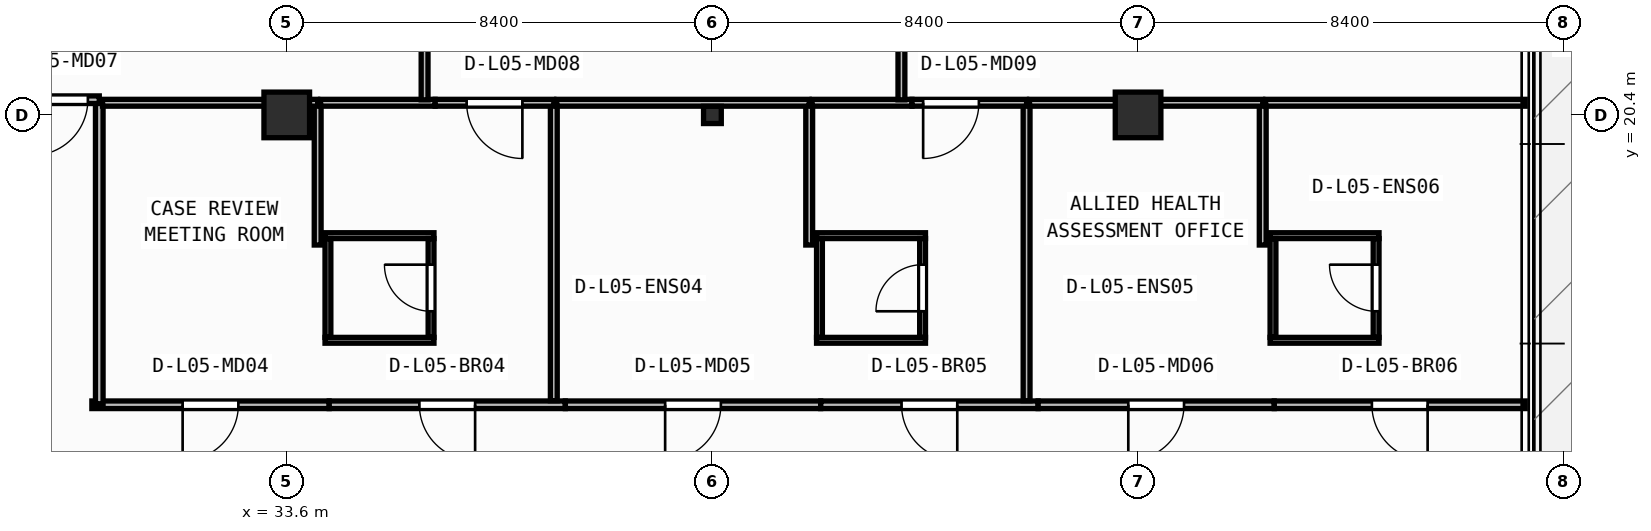
"""IFC4 building model, lengths in metres.
Left out: names, types, materials, properties, quantities, classifications, styles, units other than length and angle.
Written with IfcOpenShell. Run it as: python <this file> out.ifc"""

import sys

from ifc_helpers import new_model, si_unit, direction, frame, frame_2d, origin, origin_2d, place, context, subcontext, project, spatial, rectangle, i_section, extrude, element, fill, save


model = new_model("IFC4")
c1 = context("Model", 3, precision=1e-05, world=origin(), true_north=direction((0.0, 1.0)))
c2 = subcontext(c1, "Body", "Model", "MODEL_VIEW")
j1 = project(units=[si_unit("LENGTHUNIT", "METRE"), si_unit("PLANEANGLEUNIT", "RADIAN")], contexts=[c1])
p1 = place(None, origin())
s1 = spatial("IfcSite", under=j1, at=p1, CompositionType="ELEMENT")
p2 = place(p1, origin())
s2 = spatial("IfcBuilding", under=s1, at=p2, CompositionType="ELEMENT")
p3 = place(p2, frame((0.0, 0.0, 22.5)))
s3 = spatial("IfcBuildingStorey", under=s2, at=p3, CompositionType="ELEMENT", Elevation=22.5)
p4 = place(p3, frame((33.6, 20.4, 0.0), z_axis=(0.0, 0.0, 1.0), x_axis=(1.0, 0.0, 0.0)))
e1 = element("IfcColumn", 1, at=p4, inside=s3, PredefinedType="COLUMN", context=c2, shape_type="SweptSolid", body=[
    extrude(rectangle(XDim=0.9, YDim=0.9, at=origin_2d()), origin(), (0.0, 0.0, 1.0), 3.95),
])
p5 = place(p3, frame((42.0, 20.4, 0.0), z_axis=(0.0, 0.0, 1.0), x_axis=(1.0, 0.0, 0.0)))
e2 = element("IfcColumn", 2, at=p5, inside=s3, PredefinedType="COLUMN", context=c2, shape_type="SweptSolid", body=[
    extrude(i_section(OverallWidth=0.35, OverallDepth=0.34, WebThickness=0.016, FlangeThickness=0.028, at=origin_2d()), origin(), (0.0, 0.0, 1.0), 3.95),
])
p6 = place(p3, frame((50.4, 20.4, 0.0), z_axis=(0.0, 0.0, 1.0), x_axis=(1.0, 0.0, 0.0)))
e3 = element("IfcColumn", 3, at=p6, inside=s3, PredefinedType="COLUMN", context=c2, shape_type="SweptSolid", body=[
    extrude(rectangle(XDim=0.9, YDim=0.9, at=origin_2d()), origin(), (0.0, 0.0, 1.0), 3.95),
])
p7 = place(p3, frame((34.355, 15.952, 0.0), z_axis=(0.0, 0.0, 1.0), x_axis=(1.0, 0.0, 0.0)))
e4 = element("IfcWall", 4, at=p7, inside=s3, PredefinedType="PARTITIONING", context=c2, shape_type="SweptSolid", body=[
    extrude(rectangle(XDim=2.15, YDim=0.115, at=frame_2d((1.075, 0.0))), origin(), (0.0, 0.0, 1.0), 3.381),
])
p8 = place(p3, frame((34.355, 18.018, 0.0), z_axis=(0.0, 0.0, 1.0), x_axis=(1.0, 0.0, 0.0)))
e5 = element("IfcWall", 5, at=p8, inside=s3, PredefinedType="PARTITIONING", context=c2, shape_type="SweptSolid", body=[
    extrude(rectangle(XDim=2.15, YDim=0.115, at=frame_2d((1.075, 0.0))), origin(), (0.0, 0.0, 1.0), 3.71),
])
p9 = place(p3, frame((34.413, 16.01, 0.0), z_axis=(0.0, 0.0, 1.0), x_axis=(0.0, 1.0, 0.0)))
e6 = element("IfcWall", 6, at=p9, inside=s3, PredefinedType="PARTITIONING", context=c2, shape_type="SweptSolid", body=[
    extrude(rectangle(XDim=1.95, YDim=0.115, at=frame_2d((0.975, 0.0))), origin(), (0.0, 0.0, 1.0), 3.71),
])
p10 = place(p3, frame((36.448, 16.01, 0.0), z_axis=(0.0, 0.0, 1.0), x_axis=(0.0, 1.0, 0.0)))
e7 = element("IfcWall", 7, at=p10, inside=s3, PredefinedType="PARTITIONING", context=c2, shape_type="SweptSolid", body=[
    extrude(rectangle(XDim=1.95, YDim=0.115, at=frame_2d((0.975, 0.0))), origin(), (0.0, 0.0, 1.0), 3.71),
])
p11 = place(p10, frame((0.515, 0.0, 0.0)))
e8 = element("IfcOpeningElement", 8, at=p11, cuts=e7, PredefinedType="OPENING", context=c2, shape_type="SweptSolid", body=[
    extrude(rectangle(XDim=0.92, YDim=2.1, at=frame_2d((0.46, 1.05))), frame((0.0, 0.067, 0.0), z_axis=(0.0, -1.0, 0.0), x_axis=(1.0, 0.0, 0.0)), (0.0, 0.0, 1.0), 0.135),
])
p12 = place(p3, frame((44.055, 15.952, 0.0), z_axis=(0.0, 0.0, 1.0), x_axis=(1.0, 0.0, 0.0)))
e9 = element("IfcWall", 9, at=p12, inside=s3, PredefinedType="PARTITIONING", context=c2, shape_type="SweptSolid", body=[
    extrude(rectangle(XDim=2.15, YDim=0.115, at=frame_2d((1.075, 0.0))), origin(), (0.0, 0.0, 1.0), 3.381),
])
p13 = place(p3, frame((44.055, 18.018, 0.0), z_axis=(0.0, 0.0, 1.0), x_axis=(1.0, 0.0, 0.0)))
e10 = element("IfcWall", 10, at=p13, inside=s3, PredefinedType="PARTITIONING", context=c2, shape_type="SweptSolid", body=[
    extrude(rectangle(XDim=2.15, YDim=0.115, at=frame_2d((1.075, 0.0))), origin(), (0.0, 0.0, 1.0), 3.71),
])
p14 = place(p3, frame((44.113, 16.01, 0.0), z_axis=(0.0, 0.0, 1.0), x_axis=(0.0, 1.0, 0.0)))
e11 = element("IfcWall", 11, at=p14, inside=s3, PredefinedType="PARTITIONING", context=c2, shape_type="SweptSolid", body=[
    extrude(rectangle(XDim=1.95, YDim=0.115, at=frame_2d((0.975, 0.0))), origin(), (0.0, 0.0, 1.0), 3.71),
])
p15 = place(p3, frame((46.147, 16.01, 0.0), z_axis=(0.0, 0.0, 1.0), x_axis=(0.0, 1.0, 0.0)))
e12 = element("IfcWall", 12, at=p15, inside=s3, PredefinedType="PARTITIONING", context=c2, shape_type="SweptSolid", body=[
    extrude(rectangle(XDim=1.95, YDim=0.115, at=frame_2d((0.975, 0.0))), origin(), (0.0, 0.0, 1.0), 3.71),
])
p16 = place(p15, frame((0.515, 0.0, 0.0)))
e13 = element("IfcOpeningElement", 13, at=p16, cuts=e12, PredefinedType="OPENING", context=c2, shape_type="SweptSolid", body=[
    extrude(rectangle(XDim=0.92, YDim=2.1, at=frame_2d((0.46, 1.05))), frame((0.0, 0.067, 0.0), z_axis=(0.0, -1.0, 0.0), x_axis=(1.0, 0.0, 0.0)), (0.0, 0.0, 1.0), 0.135),
])
for number, where, z_axis, x_axis in (
    (14, (53.005, 15.952, 0.0), (0.0, 0.0, 1.0), (1.0, 0.0, 0.0)),
    (15, (53.005, 18.018, 0.0), (0.0, 0.0, 1.0), (1.0, 0.0, 0.0)),
):
    element("IfcWall", number, at=place(p3, frame(where, z_axis=z_axis, x_axis=x_axis)), inside=s3, PredefinedType="PARTITIONING", context=c2, shape_type="SweptSolid", body=[
        extrude(rectangle(XDim=2.15, YDim=0.115, at=frame_2d((1.075, 0.0))), origin(), (0.0, 0.0, 1.0), 3.71),
    ])
p17 = place(p3, frame((53.062, 16.01, 0.0), z_axis=(0.0, 0.0, 1.0), x_axis=(0.0, 1.0, 0.0)))
e16 = element("IfcWall", 16, at=p17, inside=s3, PredefinedType="PARTITIONING", context=c2, shape_type="SweptSolid", body=[
    extrude(rectangle(XDim=1.95, YDim=0.115, at=frame_2d((0.975, 0.0))), origin(), (0.0, 0.0, 1.0), 3.71),
])
p18 = place(p3, frame((55.097, 16.01, 0.0), z_axis=(0.0, 0.0, 1.0), x_axis=(0.0, 1.0, 0.0)))
e17 = element("IfcWall", 17, at=p18, inside=s3, PredefinedType="PARTITIONING", context=c2, shape_type="SweptSolid", body=[
    extrude(rectangle(XDim=1.95, YDim=0.115, at=frame_2d((0.975, 0.0))), origin(), (0.0, 0.0, 1.0), 3.71),
])
p19 = place(p18, frame((0.515, 0.0, 0.0)))
e18 = element("IfcOpeningElement", 18, at=p19, cuts=e17, PredefinedType="OPENING", context=c2, shape_type="SweptSolid", body=[
    extrude(rectangle(XDim=0.92, YDim=2.1, at=frame_2d((0.46, 1.05))), frame((0.0, 0.067, 0.0), z_axis=(0.0, -1.0, 0.0), x_axis=(1.0, 0.0, 0.0)), (0.0, 0.0, 1.0), 0.135),
])
p20 = place(p3, frame((34.436, 14.68, 0.0), z_axis=(0.0, 0.0, 1.0), x_axis=(-1.0, 0.0, 0.0)))
e19 = element("IfcWall", 19, at=p20, inside=s3, PredefinedType="PARTITIONING", context=c2, shape_type="SweptSolid", body=[
    extrude(rectangle(XDim=4.682, YDim=0.15, at=frame_2d((2.341, 0.0))), origin(), (0.0, 0.0, 1.0), 3.71),
])
p21 = place(p20, frame((1.791, 0.0, 0.0)))
e20 = element("IfcOpeningElement", 20, at=p21, cuts=e19, PredefinedType="OPENING", context=c2, shape_type="SweptSolid", body=[
    extrude(rectangle(XDim=1.1, YDim=2.1, at=frame_2d((0.55, 1.05))), frame((0.0, 0.085, 0.0), z_axis=(0.0, -1.0, 0.0), x_axis=(1.0, 0.0, 0.0)), (0.0, 0.0, 1.0), 0.17),
])
p22 = place(p3, frame((39.096, 14.68, 0.0), z_axis=(0.0, 0.0, 1.0), x_axis=(-1.0, 0.0, 0.0)))
e21 = element("IfcWall", 21, at=p22, inside=s3, PredefinedType="PARTITIONING", context=c2, shape_type="SweptSolid", body=[
    extrude(rectangle(XDim=4.658, YDim=0.15, at=frame_2d((2.329, 0.0))), origin(), (0.0, 0.0, 1.0), 3.71),
])
p23 = place(p22, frame((1.779, 0.0, 0.0)))
e22 = element("IfcOpeningElement", 22, at=p23, cuts=e21, PredefinedType="OPENING", context=c2, shape_type="SweptSolid", body=[
    extrude(rectangle(XDim=1.1, YDim=2.1, at=frame_2d((0.55, 1.05))), frame((0.0, 0.085, 0.0), z_axis=(0.0, -1.0, 0.0), x_axis=(1.0, 0.0, 0.0)), (0.0, 0.0, 1.0), 0.17),
])
p24 = place(p3, frame((44.136, 14.68, 0.0), z_axis=(0.0, 0.0, 1.0), x_axis=(-1.0, 0.0, 0.0)))
e23 = element("IfcWall", 23, at=p24, inside=s3, PredefinedType="PARTITIONING", context=c2, shape_type="SweptSolid", body=[
    extrude(rectangle(XDim=5.038, YDim=0.15, at=frame_2d((2.519, 0.0))), origin(), (0.0, 0.0, 1.0), 3.71),
])
p25 = place(p24, frame((1.969, 0.0, 0.0)))
e24 = element("IfcOpeningElement", 24, at=p25, cuts=e23, PredefinedType="OPENING", context=c2, shape_type="SweptSolid", body=[
    extrude(rectangle(XDim=1.1, YDim=2.1, at=frame_2d((0.55, 1.05))), frame((0.0, 0.085, 0.0), z_axis=(0.0, -1.0, 0.0), x_axis=(1.0, 0.0, 0.0)), (0.0, 0.0, 1.0), 0.17),
])
p26 = place(p3, frame((48.426, 14.68, 0.0), z_axis=(0.0, 0.0, 1.0), x_axis=(-1.0, 0.0, 0.0)))
e25 = element("IfcWall", 25, at=p26, inside=s3, PredefinedType="PARTITIONING", context=c2, shape_type="SweptSolid", body=[
    extrude(rectangle(XDim=4.288, YDim=0.15, at=frame_2d((2.144, 0.0))), origin(), (0.0, 0.0, 1.0), 3.71),
])
p27 = place(p26, frame((1.594, 0.0, 0.0)))
e26 = element("IfcOpeningElement", 26, at=p27, cuts=e25, PredefinedType="OPENING", context=c2, shape_type="SweptSolid", body=[
    extrude(rectangle(XDim=1.1, YDim=2.1, at=frame_2d((0.55, 1.05))), frame((0.0, 0.085, 0.0), z_axis=(0.0, -1.0, 0.0), x_axis=(1.0, 0.0, 0.0)), (0.0, 0.0, 1.0), 0.17),
])
p28 = place(p3, frame((53.086, 14.68, 0.0), z_axis=(0.0, 0.0, 1.0), x_axis=(-1.0, 0.0, 0.0)))
e27 = element("IfcWall", 27, at=p28, inside=s3, PredefinedType="PARTITIONING", context=c2, shape_type="SweptSolid", body=[
    extrude(rectangle(XDim=4.658, YDim=0.15, at=frame_2d((2.329, 0.0))), origin(), (0.0, 0.0, 1.0), 3.71),
])
p29 = place(p28, frame((1.779, 0.0, 0.0)))
e28 = element("IfcOpeningElement", 28, at=p29, cuts=e27, PredefinedType="OPENING", context=c2, shape_type="SweptSolid", body=[
    extrude(rectangle(XDim=1.1, YDim=2.1, at=frame_2d((0.55, 1.05))), frame((0.0, 0.085, 0.0), z_axis=(0.0, -1.0, 0.0), x_axis=(1.0, 0.0, 0.0)), (0.0, 0.0, 1.0), 0.17),
])
p30 = place(p3, frame((58.04, 14.68, 0.0), z_axis=(0.0, 0.0, 1.0), x_axis=(-1.0, 0.0, 0.0)))
e29 = element("IfcWall", 29, at=p30, inside=s3, PredefinedType="PARTITIONING", context=c2, shape_type="SweptSolid", body=[
    extrude(rectangle(XDim=4.952, YDim=0.15, at=frame_2d((2.476, 0.0))), origin(), (0.0, 0.0, 1.0), 3.71),
])
p31 = place(p30, frame((1.926, 0.0, 0.0)))
e30 = element("IfcOpeningElement", 30, at=p31, cuts=e29, PredefinedType="OPENING", context=c2, shape_type="SweptSolid", body=[
    extrude(rectangle(XDim=1.1, YDim=2.1, at=frame_2d((0.55, 1.05))), frame((0.0, 0.085, 0.0), z_axis=(0.0, -1.0, 0.0), x_axis=(1.0, 0.0, 0.0)), (0.0, 0.0, 1.0), 0.17),
])
p32 = place(p3, frame((29.9, 14.7, 0.0), z_axis=(0.0, 0.0, 1.0), x_axis=(0.0, 1.0, 0.0)))
e31 = element("IfcWall", 31, at=p32, inside=s3, PredefinedType="PARTITIONING", context=c2, shape_type="SweptSolid", body=[
    extrude(rectangle(XDim=6.0, YDim=0.15, at=frame_2d((3.0, 0.0))), origin(), (0.0, 0.0, 1.0), 3.71),
])
p33 = place(p3, frame((29.9, 20.7, 0.0), z_axis=(0.0, 0.0, 1.0), x_axis=(-1.0, 0.0, 0.0)))
e32 = element("IfcWall", 32, at=p33, inside=s3, PredefinedType="PARTITIONING", context=c2, shape_type="SweptSolid", body=[
    extrude(rectangle(XDim=2.5, YDim=0.15, at=frame_2d((1.25, 0.0))), origin(), (0.0, 0.0, 1.0), 3.073),
])
p34 = place(p33, frame((0.225, 0.0, 0.0)))
e33 = element("IfcOpeningElement", 33, at=p34, cuts=e32, PredefinedType="OPENING", context=c2, shape_type="SweptSolid", body=[
    extrude(rectangle(XDim=1.1, YDim=2.1, at=frame_2d((0.55, 1.05))), frame((0.0, 0.085, 0.0), z_axis=(0.0, -1.0, 0.0), x_axis=(1.0, 0.0, 0.0)), (0.0, 0.0, 1.0), 0.17),
])
p35 = place(p3, frame((34.21, 17.833, 0.0), z_axis=(0.0, 0.0, 1.0), x_axis=(0.0, 1.0, 0.0)))
e34 = element("IfcWall", 34, at=p35, inside=s3, PredefinedType="PARTITIONING", context=c2, shape_type="SweptSolid", body=[
    extrude(rectangle(XDim=2.807, YDim=0.135, at=frame_2d((1.404, 0.0))), origin(), (0.0, 0.0, 1.0), 3.71),
])
p36 = place(p3, frame((34.21, 20.64, 0.0), z_axis=(0.0, 0.0, 1.0), x_axis=(-1.0, 0.0, 0.0)))
e35 = element("IfcWall", 35, at=p36, inside=s3, PredefinedType="PARTITIONING", context=c2, shape_type="SweptSolid", body=[
    extrude(rectangle(XDim=4.245, YDim=0.135, at=frame_2d((2.123, 0.0))), origin(), (0.0, 0.0, 1.0), 3.073),
])
p37 = place(p3, frame((38.87, 14.76, 0.0), z_axis=(0.0, 0.0, 1.0), x_axis=(0.0, 1.0, 0.0)))
e36 = element("IfcWall", 36, at=p37, inside=s3, PredefinedType="PARTITIONING", context=c2, shape_type="SweptSolid", body=[
    extrude(rectangle(XDim=5.88, YDim=0.135, at=frame_2d((2.94, 0.0))), origin(), (0.0, 0.0, 1.0), 3.71),
])
p38 = place(p3, frame((36.528, 20.64, 0.0), z_axis=(0.0, 0.0, 1.0), x_axis=(-1.0, 0.0, 0.0)))
e37 = element("IfcWall", 37, at=p38, inside=s3, PredefinedType="PARTITIONING", context=c2, shape_type="SweptSolid", body=[
    extrude(rectangle(XDim=2.26, YDim=0.135, at=frame_2d((1.13, 0.0))), origin(), (0.0, 0.0, 1.0), 3.073),
])
p39 = place(p3, frame((38.87, 20.64, 0.0), z_axis=(0.0, 0.0, 1.0), x_axis=(-1.0, 0.0, 0.0)))
e38 = element("IfcWall", 38, at=p39, inside=s3, PredefinedType="PARTITIONING", context=c2, shape_type="SweptSolid", body=[
    extrude(rectangle(XDim=2.341, YDim=0.135, at=frame_2d((1.17, 0.0))), origin(), (0.0, 0.0, 1.0), 3.073),
])
p40 = place(p39, frame((0.62, 0.0, 0.0)))
e39 = element("IfcOpeningElement", 39, at=p40, cuts=e38, PredefinedType="OPENING", context=c2, shape_type="SweptSolid", body=[
    extrude(rectangle(XDim=1.1, YDim=2.1, at=frame_2d((0.55, 1.05))), frame((0.0, 0.077, 0.0), z_axis=(0.0, -1.0, 0.0), x_axis=(1.0, 0.0, 0.0)), (0.0, 0.0, 1.0), 0.155),
])
p41 = place(p3, frame((43.91, 17.833, 0.0), z_axis=(0.0, 0.0, 1.0), x_axis=(0.0, 1.0, 0.0)))
e40 = element("IfcWall", 40, at=p41, inside=s3, PredefinedType="PARTITIONING", context=c2, shape_type="SweptSolid", body=[
    extrude(rectangle(XDim=2.807, YDim=0.135, at=frame_2d((1.404, 0.0))), origin(), (0.0, 0.0, 1.0), 3.71),
])
p42 = place(p3, frame((43.91, 20.64, 0.0), z_axis=(0.0, 0.0, 1.0), x_axis=(-1.0, 0.0, 0.0)))
e41 = element("IfcWall", 41, at=p42, inside=s3, PredefinedType="PARTITIONING", context=c2, shape_type="SweptSolid", body=[
    extrude(rectangle(XDim=4.982, YDim=0.135, at=frame_2d((2.491, 0.0))), origin(), (0.0, 0.0, 1.0), 3.073),
])
p43 = place(p3, frame((48.2, 14.76, 0.0), z_axis=(0.0, 0.0, 1.0), x_axis=(0.0, 1.0, 0.0)))
e42 = element("IfcWall", 42, at=p43, inside=s3, PredefinedType="PARTITIONING", context=c2, shape_type="SweptSolid", body=[
    extrude(rectangle(XDim=5.88, YDim=0.135, at=frame_2d((2.94, 0.0))), origin(), (0.0, 0.0, 1.0), 3.71),
])
p44 = place(p3, frame((45.938, 20.64, 0.0), z_axis=(0.0, 0.0, 1.0), x_axis=(-1.0, 0.0, 0.0)))
e43 = element("IfcWall", 43, at=p44, inside=s3, PredefinedType="PARTITIONING", context=c2, shape_type="SweptSolid", body=[
    extrude(rectangle(XDim=1.97, YDim=0.135, at=frame_2d((0.985, 0.0))), origin(), (0.0, 0.0, 1.0), 3.073),
])
p45 = place(p3, frame((48.2, 20.64, 0.0), z_axis=(0.0, 0.0, 1.0), x_axis=(-1.0, 0.0, 0.0)))
e44 = element("IfcWall", 44, at=p45, inside=s3, PredefinedType="PARTITIONING", context=c2, shape_type="SweptSolid", body=[
    extrude(rectangle(XDim=2.26, YDim=0.135, at=frame_2d((1.13, 0.0))), origin(), (0.0, 0.0, 1.0), 3.073),
])
p46 = place(p45, frame((0.941, 0.0, 0.0)))
e45 = element("IfcOpeningElement", 45, at=p46, cuts=e44, PredefinedType="OPENING", context=c2, shape_type="SweptSolid", body=[
    extrude(rectangle(XDim=1.1, YDim=2.1, at=frame_2d((0.55, 1.05))), frame((0.0, 0.077, 0.0), z_axis=(0.0, -1.0, 0.0), x_axis=(1.0, 0.0, 0.0)), (0.0, 0.0, 1.0), 0.155),
])
p47 = place(p3, frame((52.86, 17.833, 0.0), z_axis=(0.0, 0.0, 1.0), x_axis=(0.0, 1.0, 0.0)))
e46 = element("IfcWall", 46, at=p47, inside=s3, PredefinedType="PARTITIONING", context=c2, shape_type="SweptSolid", body=[
    extrude(rectangle(XDim=2.807, YDim=0.135, at=frame_2d((1.404, 0.0))), origin(), (0.0, 0.0, 1.0), 3.71),
])
p48 = place(p3, frame((52.86, 20.64, 0.0), z_axis=(0.0, 0.0, 1.0), x_axis=(-1.0, 0.0, 0.0)))
e47 = element("IfcWall", 47, at=p48, inside=s3, PredefinedType="PARTITIONING", context=c2, shape_type="SweptSolid", body=[
    extrude(rectangle(XDim=4.603, YDim=0.135, at=frame_2d((2.301, 0.0))), origin(), (0.0, 0.0, 1.0), 3.073),
])
p49 = place(p3, frame((58.04, 20.64, 0.0), z_axis=(0.0, 0.0, 1.0), x_axis=(-1.0, 0.0, 0.0)))
e48 = element("IfcWall", 48, at=p49, inside=s3, PredefinedType="PARTITIONING", context=c2, shape_type="SweptSolid", body=[
    extrude(rectangle(XDim=5.123, YDim=0.135, at=frame_2d((2.561, 0.0))), origin(), (0.0, 0.0, 1.0), 3.71),
])
for number, where, z_axis, x_axis in (
    (49, (36.32, 20.698, 0.0), (0.0, 0.0, 1.0), (0.0, 1.0, 0.0)),
    (50, (45.73, 20.698, 0.0), (0.0, 0.0, 1.0), (0.0, 1.0, 0.0)),
):
    element("IfcWall", number, at=place(p3, frame(where, z_axis=z_axis, x_axis=x_axis)), inside=s3, PredefinedType="PARTITIONING", context=c2, shape_type="SweptSolid", body=[
        extrude(rectangle(XDim=6.442, YDim=0.135, at=frame_2d((3.221, 0.0))), origin(), (0.0, 0.0, 1.0), 3.71),
    ])
p50 = place(p11, origin())
e51 = element("IfcDoor", 51, at=p50, inside=s3, OperationType="SINGLE_SWING_RIGHT", PredefinedType="DOOR", context=c2, shape_type="SweptSolid", body=[
    extrude(rectangle(XDim=0.92, YDim=2.1, at=frame_2d((0.46, 1.05))), frame((0.0, 0.025, 0.0), z_axis=(0.0, -1.0, 0.0), x_axis=(1.0, 0.0, 0.0)), (0.0, 0.0, 1.0), 0.05),
])
fill(e8, e51)
p51 = place(p16, origin())
e52 = element("IfcDoor", 52, at=p51, inside=s3, OperationType="SINGLE_SWING_LEFT", PredefinedType="DOOR", context=c2, shape_type="SweptSolid", body=[
    extrude(rectangle(XDim=0.92, YDim=2.1, at=frame_2d((0.46, 1.05))), frame((0.0, 0.025, 0.0), z_axis=(0.0, -1.0, 0.0), x_axis=(1.0, 0.0, 0.0)), (0.0, 0.0, 1.0), 0.05),
])
fill(e13, e52)
p52 = place(p19, origin())
e53 = element("IfcDoor", 53, at=p52, inside=s3, OperationType="SINGLE_SWING_RIGHT", PredefinedType="DOOR", context=c2, shape_type="SweptSolid", body=[
    extrude(rectangle(XDim=0.92, YDim=2.1, at=frame_2d((0.46, 1.05))), frame((0.0, 0.025, 0.0), z_axis=(0.0, -1.0, 0.0), x_axis=(1.0, 0.0, 0.0)), (0.0, 0.0, 1.0), 0.05),
])
fill(e18, e53)
p53 = place(p21, origin())
e54 = element("IfcDoor", 54, at=p53, inside=s3, OperationType="SINGLE_SWING_RIGHT", PredefinedType="DOOR", context=c2, shape_type="SweptSolid", body=[
    extrude(rectangle(XDim=1.1, YDim=2.1, at=frame_2d((0.55, 1.05))), frame((0.0, 0.025, 0.0), z_axis=(0.0, -1.0, 0.0), x_axis=(1.0, 0.0, 0.0)), (0.0, 0.0, 1.0), 0.05),
])
fill(e20, e54)
p54 = place(p23, origin())
e55 = element("IfcDoor", 55, at=p54, inside=s3, OperationType="SINGLE_SWING_LEFT", PredefinedType="DOOR", context=c2, shape_type="SweptSolid", body=[
    extrude(rectangle(XDim=1.1, YDim=2.1, at=frame_2d((0.55, 1.05))), frame((0.0, 0.025, 0.0), z_axis=(0.0, -1.0, 0.0), x_axis=(1.0, 0.0, 0.0)), (0.0, 0.0, 1.0), 0.05),
])
fill(e22, e55)
p55 = place(p25, origin())
e56 = element("IfcDoor", 56, at=p55, inside=s3, OperationType="SINGLE_SWING_RIGHT", PredefinedType="DOOR", context=c2, shape_type="SweptSolid", body=[
    extrude(rectangle(XDim=1.1, YDim=2.1, at=frame_2d((0.55, 1.05))), frame((0.0, 0.025, 0.0), z_axis=(0.0, -1.0, 0.0), x_axis=(1.0, 0.0, 0.0)), (0.0, 0.0, 1.0), 0.05),
])
fill(e24, e56)
p56 = place(p27, origin())
e57 = element("IfcDoor", 57, at=p56, inside=s3, OperationType="SINGLE_SWING_LEFT", PredefinedType="DOOR", context=c2, shape_type="SweptSolid", body=[
    extrude(rectangle(XDim=1.1, YDim=2.1, at=frame_2d((0.55, 1.05))), frame((0.0, 0.025, 0.0), z_axis=(0.0, -1.0, 0.0), x_axis=(1.0, 0.0, 0.0)), (0.0, 0.0, 1.0), 0.05),
])
fill(e26, e57)
p57 = place(p29, origin())
e58 = element("IfcDoor", 58, at=p57, inside=s3, OperationType="SINGLE_SWING_RIGHT", PredefinedType="DOOR", context=c2, shape_type="SweptSolid", body=[
    extrude(rectangle(XDim=1.1, YDim=2.1, at=frame_2d((0.55, 1.05))), frame((0.0, 0.025, 0.0), z_axis=(0.0, -1.0, 0.0), x_axis=(1.0, 0.0, 0.0)), (0.0, 0.0, 1.0), 0.05),
])
fill(e28, e58)
p58 = place(p31, origin())
e59 = element("IfcDoor", 59, at=p58, inside=s3, OperationType="SINGLE_SWING_LEFT", PredefinedType="DOOR", context=c2, shape_type="SweptSolid", body=[
    extrude(rectangle(XDim=1.1, YDim=2.1, at=frame_2d((0.55, 1.05))), frame((0.0, 0.025, 0.0), z_axis=(0.0, -1.0, 0.0), x_axis=(1.0, 0.0, 0.0)), (0.0, 0.0, 1.0), 0.05),
])
fill(e30, e59)
p59 = place(p34, origin())
e60 = element("IfcDoor", 60, at=p59, inside=s3, OperationType="SINGLE_SWING_RIGHT", PredefinedType="DOOR", context=c2, shape_type="SweptSolid", body=[
    extrude(rectangle(XDim=1.1, YDim=2.1, at=frame_2d((0.55, 1.05))), frame((0.0, 0.025, 0.0), z_axis=(0.0, -1.0, 0.0), x_axis=(1.0, 0.0, 0.0)), (0.0, 0.0, 1.0), 0.05),
])
fill(e33, e60)
p60 = place(p40, origin())
e61 = element("IfcDoor", 61, at=p60, inside=s3, OperationType="SINGLE_SWING_LEFT", PredefinedType="DOOR", context=c2, shape_type="SweptSolid", body=[
    extrude(rectangle(XDim=1.1, YDim=2.1, at=frame_2d((0.55, 1.05))), frame((0.0, 0.025, 0.0), z_axis=(0.0, -1.0, 0.0), x_axis=(1.0, 0.0, 0.0)), (0.0, 0.0, 1.0), 0.05),
])
fill(e39, e61)
p61 = place(p46, origin())
e62 = element("IfcDoor", 62, at=p61, inside=s3, OperationType="SINGLE_SWING_RIGHT", PredefinedType="DOOR", context=c2, shape_type="SweptSolid", body=[
    extrude(rectangle(XDim=1.1, YDim=2.1, at=frame_2d((0.55, 1.05))), frame((0.0, 0.025, 0.0), z_axis=(0.0, -1.0, 0.0), x_axis=(1.0, 0.0, 0.0)), (0.0, 0.0, 1.0), 0.05),
])
fill(e45, e62)
save(model, sys.argv[1])
